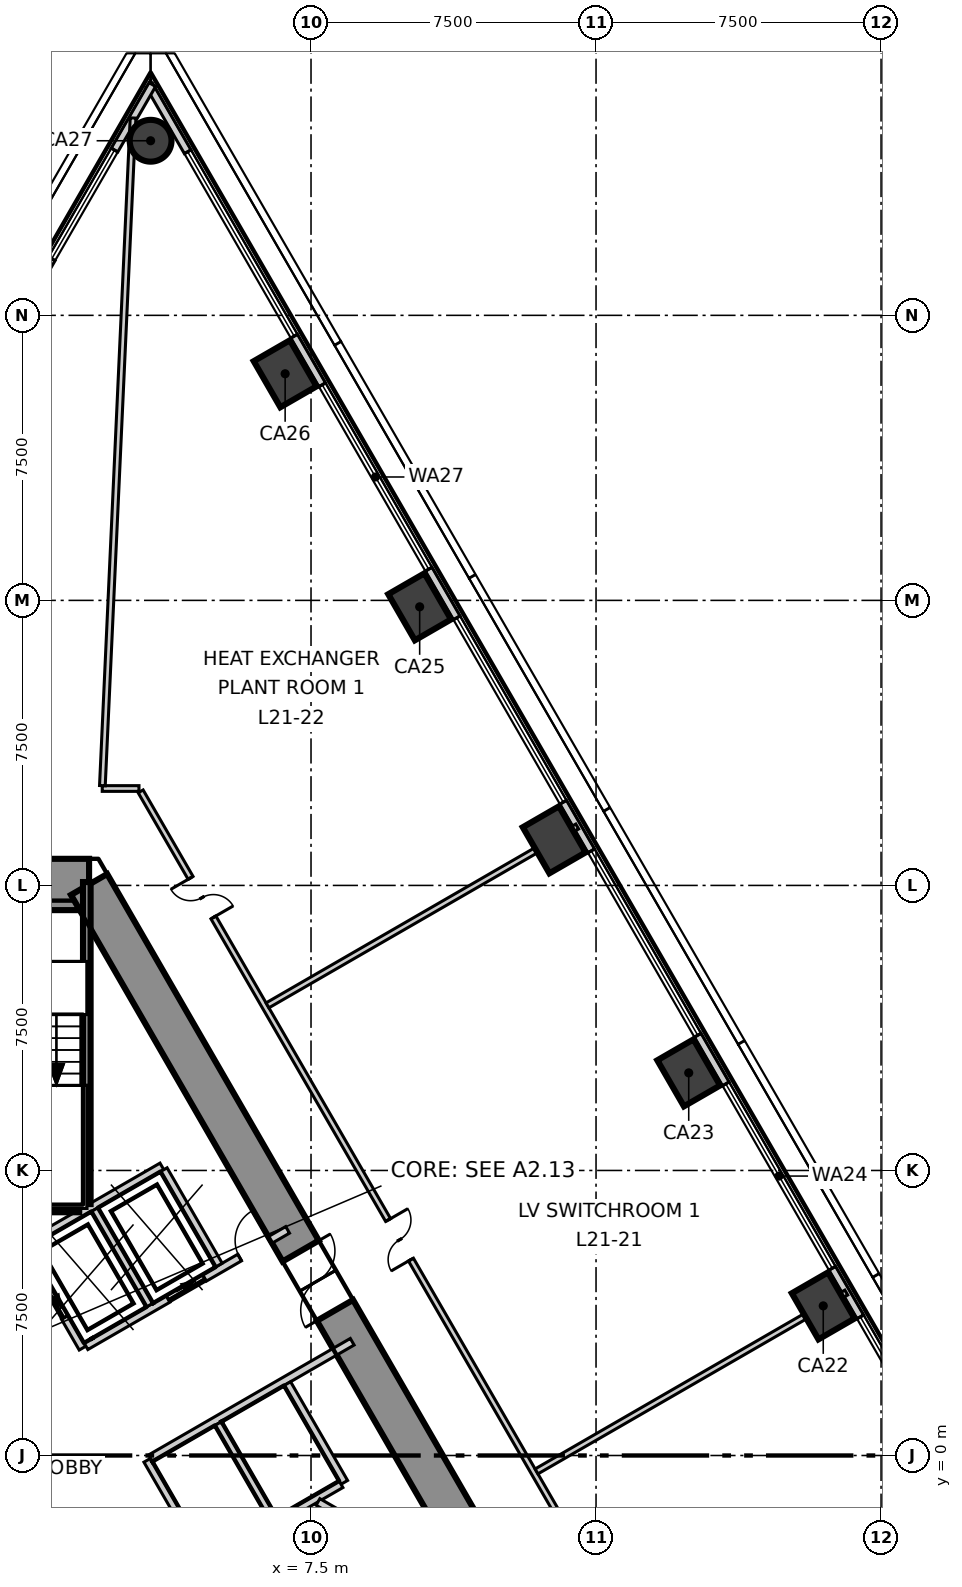
"""IFC4 building model, lengths in metres.
Left out: names, types, materials, properties, quantities, classifications, styles, units other than length and angle.
Written with IfcOpenShell. Run it as: python <this file> out.ifc"""

import sys

from ifc_helpers import new_model, si_unit, direction, frame, frame_2d, origin, origin_2d, place, context, subcontext, project, spatial, polyline, rectangle, circle, outline, extrude, element, fill, save


model = new_model("IFC4")
c1 = context("Model", 3, precision=1e-05, world=origin(), true_north=direction((0.0, 1.0)))
c2 = subcontext(c1, "Body", "Model", "MODEL_VIEW")
j1 = project(units=[si_unit("LENGTHUNIT", "METRE"), si_unit("PLANEANGLEUNIT", "RADIAN")], contexts=[c1])
p1 = place(None, origin())
s1 = spatial("IfcSite", under=j1, at=p1, CompositionType="ELEMENT")
p2 = place(p1, origin())
s2 = spatial("IfcBuilding", under=s1, at=p2, CompositionType="ELEMENT")
p3 = place(p2, frame((0.0, 0.0, 95.3)))
s3 = spatial("IfcBuildingStorey", under=s2, at=p3, CompositionType="ELEMENT", Elevation=95.3)
p4 = place(p3, frame((1.66, 15.025, -0.3), z_axis=(0.0, 0.0, 1.0), x_axis=(-1.0, 0.0, 0.0)))
e1 = element("IfcWall", 1, at=p4, inside=s3, PredefinedType="SHEAR", context=c2, shape_type="SweptSolid", body=[
    extrude(outline(polyline([(-0.245, -0.675), (1.66, -0.675), (3.565, -0.675), (3.075, 0.675), (1.66, 0.675), (0.245, 0.675), (-0.245, -0.675)])), origin(), (0.0, 0.0, 1.0), 4.2),
])
p5 = place(p4, frame((1.221, 0.0, 0.3)))
e2 = element("IfcOpeningElement", 2, at=p5, cuts=e1, PredefinedType="OPENING", context=c2, shape_type="SweptSolid", body=[
    extrude(rectangle(XDim=1.4, YDim=2.1, at=frame_2d((0.7, 1.05))), frame((0.0, 0.685, 0.0), z_axis=(0.0, -1.0, 0.0), x_axis=(1.0, 0.0, 0.0)), (0.0, 0.0, 1.0), 1.37),
])
p6 = place(p3, frame((13.842, -6.075, -0.3), z_axis=(0.0, 0.0, 1.0), x_axis=(-0.500003780125, 0.866023221317, 0.0)))
e3 = element("IfcWall", 3, at=p6, inside=s3, PredefinedType="SHEAR", context=c2, shape_type="SweptSolid", body=[
    extrude(outline(polyline([(-0.462, -0.55), (1.483, -0.55), (3.428, -0.55), (5.374, -0.55), (7.319, -0.55), (9.264, -0.55), (11.209, -0.55), (13.155, -0.55), (15.1, -0.55), (17.045, -0.55), (18.99, -0.55), (20.936, -0.55), (22.881, -0.55), (24.826, -0.55), (23.902, 0.55), (21.949, 0.55), (19.995, 0.55), (18.042, 0.55), (16.089, 0.55), (14.135, 0.55), (12.182, 0.55), (10.229, 0.55), (8.275, 0.55), (6.322, 0.55), (4.369, 0.55), (2.415, 0.55), (0.462, 0.55), (-0.462, -0.55)])), origin(), (0.0, 0.0, 1.0), 4.2),
])
p7 = place(p6, frame((11.426, 0.0, 0.3)))
e4 = element("IfcOpeningElement", 4, at=p7, cuts=e3, PredefinedType="OPENING", context=c2, shape_type="SweptSolid", body=[
    extrude(rectangle(XDim=1.8, YDim=2.1, at=frame_2d((0.9, 1.05))), frame((0.0, 0.56, 0.0), z_axis=(0.0, -1.0, 0.0), x_axis=(1.0, 0.0, 0.0)), (0.0, 0.0, 1.0), 1.12),
])
for number, where, z_axis, x_axis in (
    (5, (20.979, 3.937, -0.3), (0.0, 0.0, 1.0), (-0.5, 0.866, 0.0)),
    (6, (17.439, 10.068, -0.3), (0.0, 0.0, 1.0), (-0.5, 0.866, 0.0)),
    (7, (13.899, 16.2, -0.3), (0.0, 0.0, 1.0), (-0.5, 0.866, 0.0)),
    (8, (10.359, 22.331, -0.3), (0.0, 0.0, 1.0), (-0.5, 0.866, 0.0)),
    (9, (6.819, 28.463, -0.3), (0.0, 0.0, 1.0), (-0.5, 0.866, 0.0)),
):
    element("IfcColumn", number, at=place(p3, frame(where, z_axis=z_axis, x_axis=x_axis)), inside=s3, PredefinedType="COLUMN", context=c2, shape_type="SweptSolid", body=[
        extrude(rectangle(XDim=1.4, YDim=1.1, at=origin_2d()), origin(), (0.0, 0.0, 1.0), 4.2),
    ])
p8 = place(p3, frame((3.279, 34.594, -0.3), z_axis=(0.0, 0.0, 1.0), x_axis=(-0.5, 0.866025403784, 0.0)))
e10 = element("IfcColumn", 10, at=p8, inside=s3, PredefinedType="COLUMN", context=c2, shape_type="SweptSolid", body=[
    extrude(circle(Radius=0.55, at=origin_2d()), origin(), (0.0, 0.0, 1.0), 4.2),
])
p9 = place(p3, frame((32.857, -15.235, 0.0), z_axis=(0.0, 0.0, 1.0), x_axis=(-0.500009108245, 0.866020145073, 0.0)))
e11 = element("IfcWall", 11, at=p9, inside=s3, PredefinedType="ELEMENTEDWALL", context=c2, shape_type="SweptSolid", body=[
    extrude(rectangle(XDim=59.225, YDim=0.2, at=frame_2d((29.613, 0.0))), origin(), (0.0, 0.0, 1.0), 3.9),
])
p10 = place(p9, frame((2.043, 0.0, 0.9)))
e12 = element("IfcOpeningElement", 12, at=p10, cuts=e11, PredefinedType="OPENING", context=c2, shape_type="SweptSolid", body=[
    extrude(rectangle(XDim=5.6, YDim=2.5, at=frame_2d((2.8, 1.25))), frame((0.0, 0.11, 0.0), z_axis=(0.0, -1.0, 0.0), x_axis=(1.0, 0.0, 0.0)), (0.0, 0.0, 1.0), 0.22),
])
p11 = place(p9, frame((9.123, 0.0, 0.9)))
e13 = element("IfcOpeningElement", 13, at=p11, cuts=e11, PredefinedType="OPENING", context=c2, shape_type="SweptSolid", body=[
    extrude(rectangle(XDim=5.6, YDim=2.5, at=frame_2d((2.8, 1.25))), frame((0.0, 0.11, 0.0), z_axis=(0.0, -1.0, 0.0), x_axis=(1.0, 0.0, 0.0)), (0.0, 0.0, 1.0), 0.22),
])
p12 = place(p9, frame((16.203, 0.0, 0.9)))
e14 = element("IfcOpeningElement", 14, at=p12, cuts=e11, PredefinedType="OPENING", context=c2, shape_type="SweptSolid", body=[
    extrude(rectangle(XDim=5.6, YDim=2.5, at=frame_2d((2.8, 1.25))), frame((0.0, 0.11, 0.0), z_axis=(0.0, -1.0, 0.0), x_axis=(1.0, 0.0, 0.0)), (0.0, 0.0, 1.0), 0.22),
])
p13 = place(p9, frame((23.282, 0.0, 0.9)))
e15 = element("IfcOpeningElement", 15, at=p13, cuts=e11, PredefinedType="OPENING", context=c2, shape_type="SweptSolid", body=[
    extrude(rectangle(XDim=5.6, YDim=2.5, at=frame_2d((2.8, 1.25))), frame((0.0, 0.11, 0.0), z_axis=(0.0, -1.0, 0.0), x_axis=(1.0, 0.0, 0.0)), (0.0, 0.0, 1.0), 0.22),
])
p14 = place(p9, frame((30.362, 0.0, 0.9)))
e16 = element("IfcOpeningElement", 16, at=p14, cuts=e11, PredefinedType="OPENING", context=c2, shape_type="SweptSolid", body=[
    extrude(rectangle(XDim=5.6, YDim=2.5, at=frame_2d((2.8, 1.25))), frame((0.0, 0.11, 0.0), z_axis=(0.0, -1.0, 0.0), x_axis=(1.0, 0.0, 0.0)), (0.0, 0.0, 1.0), 0.22),
])
p15 = place(p9, frame((37.442, 0.0, 0.9)))
e17 = element("IfcOpeningElement", 17, at=p15, cuts=e11, PredefinedType="OPENING", context=c2, shape_type="SweptSolid", body=[
    extrude(rectangle(XDim=5.6, YDim=2.5, at=frame_2d((2.8, 1.25))), frame((0.0, 0.11, 0.0), z_axis=(0.0, -1.0, 0.0), x_axis=(1.0, 0.0, 0.0)), (0.0, 0.0, 1.0), 0.22),
])
p16 = place(p9, frame((44.522, 0.0, 0.9)))
e18 = element("IfcOpeningElement", 18, at=p16, cuts=e11, PredefinedType="OPENING", context=c2, shape_type="SweptSolid", body=[
    extrude(rectangle(XDim=5.6, YDim=2.5, at=frame_2d((2.8, 1.25))), frame((0.0, 0.11, 0.0), z_axis=(0.0, -1.0, 0.0), x_axis=(1.0, 0.0, 0.0)), (0.0, 0.0, 1.0), 0.22),
])
p17 = place(p9, frame((51.602, 0.0, 0.9)))
e19 = element("IfcOpeningElement", 19, at=p17, cuts=e11, PredefinedType="OPENING", context=c2, shape_type="SweptSolid", body=[
    extrude(rectangle(XDim=5.6, YDim=2.5, at=frame_2d((2.8, 1.25))), frame((0.0, 0.11, 0.0), z_axis=(0.0, -1.0, 0.0), x_axis=(1.0, 0.0, 0.0)), (0.0, 0.0, 1.0), 0.22),
])
p18 = place(p3, frame((3.324, 36.072, 0.0), z_axis=(0.0, 0.0, 1.0), x_axis=(-0.499914325741, -0.866074862191, 0.0)))
e20 = element("IfcWall", 20, at=p18, inside=s3, PredefinedType="ELEMENTEDWALL", context=c2, shape_type="SweptSolid", body=[
    extrude(rectangle(XDim=6.719, YDim=0.2, at=frame_2d((3.359, 0.0))), origin(), (0.0, 0.0, 1.0), 3.9),
])
p19 = place(p18, frame((1.99, 0.0, 0.9)))
e21 = element("IfcOpeningElement", 21, at=p19, cuts=e20, PredefinedType="OPENING", context=c2, shape_type="SweptSolid", body=[
    extrude(rectangle(XDim=3.3, YDim=2.5, at=frame_2d((1.65, 1.25))), frame((0.0, 0.11, 0.0), z_axis=(0.0, -1.0, 0.0), x_axis=(1.0, 0.0, 0.0)), (0.0, 0.0, 1.0), 0.22),
])
p20 = place(p3, frame((2.006, 17.55, 0.0), z_axis=(0.0, 0.0, 1.0), x_axis=(1.0, 0.0, 0.0)))
e22 = element("IfcWall", 22, at=p20, inside=s3, PredefinedType="PARTITIONING", context=c2, shape_type="SweptSolid", body=[
    extrude(rectangle(XDim=0.967, YDim=0.15, at=frame_2d((0.483, 0.0))), origin(), (0.0, 0.0, 1.0), 3.9),
])
p21 = place(p3, frame((3.017, 17.475, 0.0), z_axis=(0.0, 0.0, 1.0), x_axis=(0.499977309191, -0.866038503933, 0.0)))
e23 = element("IfcWall", 23, at=p21, inside=s3, PredefinedType="PARTITIONING", context=c2, shape_type="SweptSolid", body=[
    extrude(rectangle(XDim=27.337, YDim=0.15, at=frame_2d((13.668, 0.0))), origin(), (0.0, 0.0, 1.0), 3.9),
])
p22 = place(p21, frame((23.421, 0.0, 0.0)))
e24 = element("IfcOpeningElement", 24, at=p22, cuts=e23, PredefinedType="OPENING", context=c2, shape_type="SweptSolid", body=[
    extrude(rectangle(XDim=1.2, YDim=2.1, at=frame_2d((0.6, 1.05))), frame((0.0, 0.085, 0.0), z_axis=(0.0, -1.0, 0.0), x_axis=(1.0, 0.0, 0.0)), (0.0, 0.0, 1.0), 0.17),
])
p23 = place(p21, frame((13.025, 0.0, 0.0)))
e25 = element("IfcOpeningElement", 25, at=p23, cuts=e23, PredefinedType="OPENING", context=c2, shape_type="SweptSolid", body=[
    extrude(rectangle(XDim=1.2, YDim=2.1, at=frame_2d((0.6, 1.05))), frame((0.0, 0.085, 0.0), z_axis=(0.0, -1.0, 0.0), x_axis=(1.0, 0.0, 0.0)), (0.0, 0.0, 1.0), 0.17),
])
p24 = place(p21, frame((2.629, 0.0, 0.0)))
e26 = element("IfcOpeningElement", 26, at=p24, cuts=e23, PredefinedType="OPENING", context=c2, shape_type="SweptSolid", body=[
    extrude(rectangle(XDim=1.2, YDim=2.1, at=frame_2d((0.6, 1.05))), frame((0.0, 0.085, 0.0), z_axis=(0.0, -1.0, 0.0), x_axis=(1.0, 0.0, 0.0)), (0.0, 0.0, 1.0), 0.17),
])
p25 = place(p3, frame((2.01, 17.625, 0.0), z_axis=(0.0, 0.0, 1.0), x_axis=(0.045880565482, 0.99894693238, 0.0)))
e27 = element("IfcWall", 27, at=p25, inside=s3, PredefinedType="PARTITIONING", context=c2, shape_type="SweptSolid", body=[
    extrude(rectangle(XDim=17.587, YDim=0.15, at=frame_2d((8.793, 0.0))), origin(), (0.0, 0.0, 1.0), 3.1),
])
for number, where, z_axis, x_axis in (
    (28, (6.354, 11.844, 0.0), (0.0, 0.0, 1.0), (0.866, 0.5, 0.0)),
    (29, (13.434, -0.419, 0.0), (0.0, 0.0, 1.0), (0.866, 0.5, 0.0)),
):
    element("IfcWall", number, at=place(p3, frame(where, z_axis=z_axis, x_axis=x_axis)), inside=s3, PredefinedType="PARTITIONING", context=c2, shape_type="SweptSolid", body=[
        extrude(rectangle(XDim=9.412, YDim=0.15, at=frame_2d((4.706, 0.0))), origin(), (0.0, 0.0, 1.0), 3.9),
    ])
p26 = place(p3, frame((-0.002, 5.541, 0.0), z_axis=(0.0, 0.0, 1.0), x_axis=(0.86600155993, 0.500041296494, 0.0)))
e30 = element("IfcWall", 30, at=p26, inside=s3, PredefinedType="SOLIDWALL", context=c2, shape_type="SweptSolid", body=[
    extrude(rectangle(XDim=4.132, YDim=0.2, at=frame_2d((2.066, 0.0))), origin(), (0.0, 0.0, 1.0), 3.9),
])
p27 = place(p3, frame((0.0, 5.4, 0.0), z_axis=(0.0, 0.0, 1.0), x_axis=(0.500103862429, -0.865965430478, 0.0)))
e31 = element("IfcWall", 31, at=p27, inside=s3, PredefinedType="SOLIDWALL", context=c2, shape_type="SweptSolid", body=[
    extrude(rectangle(XDim=2.973, YDim=0.2, at=frame_2d((1.487, 0.0))), origin(), (0.0, 0.0, 1.0), 3.9),
])
p28 = place(p27, frame((0.937, 0.0, 0.0)))
e32 = element("IfcOpeningElement", 32, at=p28, cuts=e31, PredefinedType="OPENING", context=c2, shape_type="SweptSolid", body=[
    extrude(rectangle(XDim=1.1, YDim=2.1, at=frame_2d((0.55, 1.05))), frame((0.0, 0.11, 0.0), z_axis=(0.0, -1.0, 0.0), x_axis=(1.0, 0.0, 0.0)), (0.0, 0.0, 1.0), 0.22),
])
p29 = place(p3, frame((3.19, -0.125, 0.0), z_axis=(0.0, 0.0, 1.0), x_axis=(0.499988658015, -0.866031951983, 0.0)))
e33 = element("IfcWall", 33, at=p29, inside=s3, PredefinedType="SOLIDWALL", context=c2, shape_type="SweptSolid", body=[
    extrude(rectangle(XDim=2.858, YDim=0.2, at=frame_2d((1.429, 0.0))), origin(), (0.0, 0.0, 1.0), 3.9),
])
p30 = place(p3, frame((1.578, 2.874, 0.0), z_axis=(0.0, 0.0, 1.0), x_axis=(0.866062167127, 0.499936318615, 0.0)))
e34 = element("IfcWall", 34, at=p30, inside=s3, PredefinedType="SOLIDWALL", context=c2, shape_type="SweptSolid", body=[
    extrude(rectangle(XDim=6.127, YDim=0.2, at=frame_2d((3.063, 0.0))), origin(), (0.0, 0.0, 1.0), 3.9),
])
p31 = place(p30, frame((2.496, 0.0, 0.0)))
e35 = element("IfcOpeningElement", 35, at=p31, cuts=e34, PredefinedType="OPENING", context=c2, shape_type="SweptSolid", body=[
    extrude(rectangle(XDim=1.1, YDim=2.1, at=frame_2d((0.55, 1.05))), frame((0.0, 0.11, 0.0), z_axis=(0.0, -1.0, 0.0), x_axis=(1.0, 0.0, 0.0)), (0.0, 0.0, 1.0), 0.22),
])
p32 = place(p30, frame((4.671, 0.0, 0.0)))
e36 = element("IfcOpeningElement", 36, at=p32, cuts=e34, PredefinedType="OPENING", context=c2, shape_type="SweptSolid", body=[
    extrude(rectangle(XDim=0.9, YDim=2.1, at=frame_2d((0.45, 1.05))), frame((0.0, 0.11, 0.0), z_axis=(0.0, -1.0, 0.0), x_axis=(1.0, 0.0, 0.0)), (0.0, 0.0, 1.0), 0.22),
])
p33 = place(p3, frame((3.278, -0.071, 0.0), z_axis=(0.0, 0.0, 1.0), x_axis=(0.865983187006, 0.500073114477, 0.0)))
e37 = element("IfcWall", 37, at=p33, inside=s3, PredefinedType="SOLIDWALL", context=c2, shape_type="SweptSolid", body=[
    extrude(rectangle(XDim=6.127, YDim=0.2, at=frame_2d((3.063, 0.0))), origin(), (0.0, 0.0, 1.0), 3.9),
])
p34 = place(p3, frame((3.626, 7.52, 0.0), z_axis=(0.0, 0.0, 1.0), x_axis=(0.500060147554, -0.865990674793, 0.0)))
e38 = element("IfcWall", 38, at=p34, inside=s3, PredefinedType="SOLIDWALL", context=c2, shape_type="SweptSolid", body=[
    extrude(rectangle(XDim=2.9, YDim=0.2, at=frame_2d((1.45, 0.0))), origin(), (0.0, 0.0, 1.0), 3.9),
])
p35 = place(p3, frame((6.876, 1.891, 0.0), z_axis=(0.0, 0.0, 1.0), x_axis=(0.499990139034, -0.866031096941, 0.0)))
e39 = element("IfcWall", 39, at=p35, inside=s3, PredefinedType="SOLIDWALL", context=c2, shape_type="SweptSolid", body=[
    extrude(rectangle(XDim=3.0, YDim=0.2, at=frame_2d((1.5, 0.0))), origin(), (0.0, 0.0, 1.0), 3.9),
])
for number, where, z_axis, x_axis in (
    (40, (1.807, 6.47, 0.0), (0.0, 0.0, 1.0), (0.5, -0.866, 0.0)),
    (41, (5.057, 0.841, 0.0), (0.0, 0.0, 1.0), (0.5, -0.866, 0.0)),
):
    element("IfcWall", number, at=place(p3, frame(where, z_axis=z_axis, x_axis=x_axis)), inside=s3, PredefinedType="SOLIDWALL", context=c2, shape_type="SweptSolid", body=[
        extrude(rectangle(XDim=2.9, YDim=0.2, at=frame_2d((1.45, 0.0))), origin(), (0.0, 0.0, 1.0), 3.9),
    ])
p36 = place(p3, frame((4.9, -2.714, 0.0), z_axis=(0.0, 0.0, 1.0), x_axis=(0.865992350556, 0.500057245502, 0.0)))
e42 = element("IfcWall", 42, at=p36, inside=s3, PredefinedType="SOLIDWALL", context=c2, shape_type="SweptSolid", body=[
    extrude(rectangle(XDim=3.914, YDim=0.2, at=frame_2d((1.957, 0.0))), origin(), (0.0, 0.0, 1.0), 3.9),
])
p37 = place(p3, frame((7.683, -1.222, 0.0), z_axis=(0.0, 0.0, 1.0), x_axis=(0.865960281868, -0.500112777509, 0.0)))
e43 = element("IfcWall", 43, at=p37, inside=s3, PredefinedType="SOLIDWALL", context=c2, shape_type="SweptSolid", body=[
    extrude(rectangle(XDim=5.775, YDim=0.2, at=frame_2d((2.888, 0.0))), origin(), (0.0, 0.0, 1.0), 3.25),
])
p38 = place(p3, frame((1.6, 6.615, 0.0), z_axis=(0.0, 0.0, 1.0), x_axis=(0.0, 1.0, 0.0)))
e44 = element("IfcWall", 44, at=p38, inside=s3, PredefinedType="SOLIDWALL", context=c2, shape_type="SweptSolid", body=[
    extrude(rectangle(XDim=8.474, YDim=0.2, at=frame_2d((4.237, 0.0))), origin(), (0.0, 0.0, 1.0), 3.9),
])
p39 = place(p3, frame((-1.4, 6.5, 0.0), z_axis=(0.0, 0.0, 1.0), x_axis=(1.0, 0.0, 0.0)))
e45 = element("IfcWall", 45, at=p39, inside=s3, PredefinedType="SOLIDWALL", context=c2, shape_type="SweptSolid", body=[
    extrude(rectangle(XDim=2.8, YDim=0.2, at=frame_2d((1.4, 0.0))), origin(), (0.0, 0.0, 1.0), 3.9),
])
p40 = place(p12, origin())
e46 = element("IfcWindow", 46, at=p40, inside=s3, PartitioningType="SINGLE_PANEL", PredefinedType="WINDOW", context=c2, shape_type="SweptSolid", body=[
    extrude(rectangle(XDim=5.6, YDim=2.5, at=frame_2d((2.8, 1.25))), frame((0.0, 0.03, 0.0), z_axis=(0.0, -1.0, 0.0), x_axis=(1.0, 0.0, 0.0)), (0.0, 0.0, 1.0), 0.06),
])
fill(e14, e46)
p41 = place(p13, origin())
e47 = element("IfcWindow", 47, at=p41, inside=s3, PartitioningType="SINGLE_PANEL", PredefinedType="WINDOW", context=c2, shape_type="SweptSolid", body=[
    extrude(rectangle(XDim=5.6, YDim=2.5, at=frame_2d((2.8, 1.25))), frame((0.0, 0.03, 0.0), z_axis=(0.0, -1.0, 0.0), x_axis=(1.0, 0.0, 0.0)), (0.0, 0.0, 1.0), 0.06),
])
fill(e15, e47)
p42 = place(p14, origin())
e48 = element("IfcWindow", 48, at=p42, inside=s3, PartitioningType="SINGLE_PANEL", PredefinedType="WINDOW", context=c2, shape_type="SweptSolid", body=[
    extrude(rectangle(XDim=5.6, YDim=2.5, at=frame_2d((2.8, 1.25))), frame((0.0, 0.03, 0.0), z_axis=(0.0, -1.0, 0.0), x_axis=(1.0, 0.0, 0.0)), (0.0, 0.0, 1.0), 0.06),
])
fill(e16, e48)
p43 = place(p15, origin())
e49 = element("IfcWindow", 49, at=p43, inside=s3, PartitioningType="SINGLE_PANEL", PredefinedType="WINDOW", context=c2, shape_type="SweptSolid", body=[
    extrude(rectangle(XDim=5.6, YDim=2.5, at=frame_2d((2.8, 1.25))), frame((0.0, 0.03, 0.0), z_axis=(0.0, -1.0, 0.0), x_axis=(1.0, 0.0, 0.0)), (0.0, 0.0, 1.0), 0.06),
])
fill(e17, e49)
p44 = place(p16, origin())
e50 = element("IfcWindow", 50, at=p44, inside=s3, PartitioningType="SINGLE_PANEL", PredefinedType="WINDOW", context=c2, shape_type="SweptSolid", body=[
    extrude(rectangle(XDim=5.6, YDim=2.5, at=frame_2d((2.8, 1.25))), frame((0.0, 0.03, 0.0), z_axis=(0.0, -1.0, 0.0), x_axis=(1.0, 0.0, 0.0)), (0.0, 0.0, 1.0), 0.06),
])
fill(e18, e50)
p45 = place(p17, origin())
e51 = element("IfcWindow", 51, at=p45, inside=s3, PartitioningType="SINGLE_PANEL", PredefinedType="WINDOW", context=c2, shape_type="SweptSolid", body=[
    extrude(rectangle(XDim=5.6, YDim=2.5, at=frame_2d((2.8, 1.25))), frame((0.0, 0.03, 0.0), z_axis=(0.0, -1.0, 0.0), x_axis=(1.0, 0.0, 0.0)), (0.0, 0.0, 1.0), 0.06),
])
fill(e19, e51)
p46 = place(p19, origin())
e52 = element("IfcWindow", 52, at=p46, inside=s3, PartitioningType="SINGLE_PANEL", PredefinedType="WINDOW", context=c2, shape_type="SweptSolid", body=[
    extrude(rectangle(XDim=3.3, YDim=2.5, at=frame_2d((1.65, 1.25))), frame((0.0, 0.03, 0.0), z_axis=(0.0, -1.0, 0.0), x_axis=(1.0, 0.0, 0.0)), (0.0, 0.0, 1.0), 0.06),
])
fill(e21, e52)
p47 = place(p28, origin())
e53 = element("IfcDoor", 53, at=p47, inside=s3, OperationType="SLIDING_TO_LEFT", PredefinedType="DOOR", context=c2, shape_type="SweptSolid", body=[
    extrude(rectangle(XDim=1.1, YDim=2.1, at=frame_2d((0.55, 1.05))), frame((0.0, 0.025, 0.0), z_axis=(0.0, -1.0, 0.0), x_axis=(1.0, 0.0, 0.0)), (0.0, 0.0, 1.0), 0.05),
])
fill(e32, e53)
p48 = place(p31, origin())
e54 = element("IfcDoor", 54, at=p48, inside=s3, OperationType="SLIDING_TO_LEFT", PredefinedType="DOOR", context=c2, shape_type="SweptSolid", body=[
    extrude(rectangle(XDim=1.1, YDim=2.1, at=frame_2d((0.55, 1.05))), frame((0.0, 0.025, 0.0), z_axis=(0.0, -1.0, 0.0), x_axis=(1.0, 0.0, 0.0)), (0.0, 0.0, 1.0), 0.05),
])
fill(e35, e54)
p49 = place(p23, origin())
e55 = element("IfcDoor", 55, at=p49, inside=s3, OperationType="DOUBLE_DOOR_SINGLE_SWING", PredefinedType="DOOR", context=c2, shape_type="SweptSolid", body=[
    extrude(rectangle(XDim=1.2, YDim=2.1, at=frame_2d((0.6, 1.05))), frame((0.0, 0.025, 0.0), z_axis=(0.0, -1.0, 0.0), x_axis=(1.0, 0.0, 0.0)), (0.0, 0.0, 1.0), 0.05),
])
fill(e25, e55)
p50 = place(p24, origin())
e56 = element("IfcDoor", 56, at=p50, inside=s3, OperationType="DOUBLE_DOOR_SINGLE_SWING", PredefinedType="DOOR", context=c2, shape_type="SweptSolid", body=[
    extrude(rectangle(XDim=1.2, YDim=2.1, at=frame_2d((0.6, 1.05))), frame((0.0, 0.025, 0.0), z_axis=(0.0, -1.0, 0.0), x_axis=(1.0, 0.0, 0.0)), (0.0, 0.0, 1.0), 0.05),
])
fill(e26, e56)
p51 = place(p7, origin())
e57 = element("IfcDoor", 57, at=p51, inside=s3, OperationType="DOUBLE_DOOR_SINGLE_SWING", PredefinedType="DOOR", context=c2, shape_type="SweptSolid", body=[
    extrude(rectangle(XDim=1.8, YDim=2.1, at=frame_2d((0.9, 1.05))), frame((0.0, 0.025, 0.0), z_axis=(0.0, -1.0, 0.0), x_axis=(1.0, 0.0, 0.0)), (0.0, 0.0, 1.0), 0.05),
])
fill(e4, e57)
p52 = place(p32, origin())
e58 = element("IfcDoor", 58, at=p52, inside=s3, OperationType="SINGLE_SWING_LEFT", PredefinedType="DOOR", context=c2, shape_type="SweptSolid", body=[
    extrude(rectangle(XDim=0.9, YDim=2.1, at=frame_2d((0.45, 1.05))), frame((0.0, 0.025, 0.0), z_axis=(0.0, -1.0, 0.0), x_axis=(1.0, 0.0, 0.0)), (0.0, 0.0, 1.0), 0.05),
])
fill(e36, e58)
save(model, sys.argv[1])
